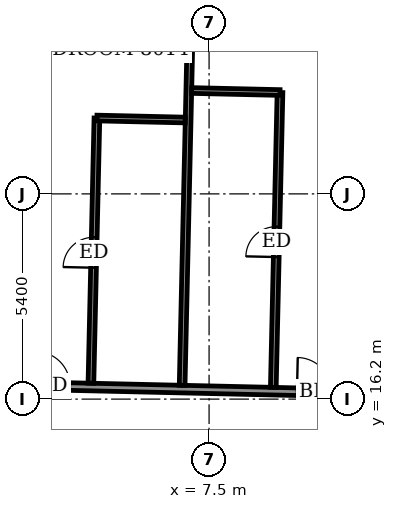
"""IFC4 building model, lengths in metres.
Left out: names, types, materials, properties, quantities, classifications, styles, units other than length and angle.
Written with IfcOpenShell. Run it as: python <this file> out.ifc"""

import sys

from ifc_helpers import new_model, si_unit, direction, frame, frame_2d, origin, place, context, subcontext, project, spatial, rectangle, extrude, element, fill, save


model = new_model("IFC4")
c1 = context("Model", 3, precision=1e-05, world=origin(), true_north=direction((0.0, 1.0)))
c2 = subcontext(c1, "Body", "Model", "MODEL_VIEW")
j1 = project(units=[si_unit("LENGTHUNIT", "METRE"), si_unit("PLANEANGLEUNIT", "RADIAN")], contexts=[c1])
p1 = place(None, origin())
s1 = spatial("IfcSite", under=j1, at=p1, CompositionType="ELEMENT")
p2 = place(p1, origin())
s2 = spatial("IfcBuilding", under=s1, at=p2, CompositionType="ELEMENT")
p3 = place(p2, frame((0.0, 0.0, 313.3)))
s3 = spatial("IfcBuildingStorey", under=s2, at=p3, CompositionType="ELEMENT", Elevation=313.3)
p4 = place(p3, frame((-30.652, 17.313, 0.0), z_axis=(0.0, 0.0, 1.0), x_axis=(0.999742623764, -0.02268669719, 0.0)))
e1 = element("IfcWall", 1, at=p4, inside=s3, PredefinedType="PARTITIONING", context=c2, shape_type="SweptSolid", body=[
    extrude(rectangle(XDim=58.8, YDim=0.2, at=frame_2d((29.4, 0.0))), origin(), (0.0, 0.0, 1.0), 3.05),
])
p5 = place(p4, frame((54.601, 0.0, 0.0)))
e2 = element("IfcOpeningElement", 2, at=p5, cuts=e1, PredefinedType="OPENING", context=c2, shape_type="SweptSolid", body=[
    extrude(rectangle(XDim=1.0, YDim=2.1, at=frame_2d((0.5, 1.05))), frame((0.0, 0.11, 0.0), z_axis=(0.0, -1.0, 0.0), x_axis=(1.0, 0.0, 0.0)), (0.0, 0.0, 1.0), 0.22),
])
p6 = place(p4, frame((49.35, 0.0, 0.0)))
e3 = element("IfcOpeningElement", 3, at=p6, cuts=e1, PredefinedType="OPENING", context=c2, shape_type="SweptSolid", body=[
    extrude(rectangle(XDim=0.9, YDim=2.1, at=frame_2d((0.45, 1.05))), frame((0.0, 0.11, 0.0), z_axis=(0.0, -1.0, 0.0), x_axis=(1.0, 0.0, 0.0)), (0.0, 0.0, 1.0), 0.22),
])
p7 = place(p4, frame((42.55, 0.0, 0.0)))
e4 = element("IfcOpeningElement", 4, at=p7, cuts=e1, PredefinedType="OPENING", context=c2, shape_type="SweptSolid", body=[
    extrude(rectangle(XDim=0.9, YDim=2.1, at=frame_2d((0.45, 1.05))), frame((0.0, 0.11, 0.0), z_axis=(0.0, -1.0, 0.0), x_axis=(1.0, 0.0, 0.0)), (0.0, 0.0, 1.0), 0.22),
])
p8 = place(p4, frame((40.475, 0.0, 0.0)))
e5 = element("IfcOpeningElement", 5, at=p8, cuts=e1, PredefinedType="OPENING", context=c2, shape_type="SweptSolid", body=[
    extrude(rectangle(XDim=0.9, YDim=2.1, at=frame_2d((0.45, 1.05))), frame((0.0, 0.11, 0.0), z_axis=(0.0, -1.0, 0.0), x_axis=(1.0, 0.0, 0.0)), (0.0, 0.0, 1.0), 0.22),
])
p9 = place(p4, frame((33.6, 0.0, 0.0)))
e6 = element("IfcOpeningElement", 6, at=p9, cuts=e1, PredefinedType="OPENING", context=c2, shape_type="SweptSolid", body=[
    extrude(rectangle(XDim=0.9, YDim=2.1, at=frame_2d((0.45, 1.05))), frame((0.0, 0.11, 0.0), z_axis=(0.0, -1.0, 0.0), x_axis=(1.0, 0.0, 0.0)), (0.0, 0.0, 1.0), 0.22),
])
p10 = place(p4, frame((31.55, 0.0, 0.0)))
e7 = element("IfcOpeningElement", 7, at=p10, cuts=e1, PredefinedType="OPENING", context=c2, shape_type="SweptSolid", body=[
    extrude(rectangle(XDim=0.9, YDim=2.1, at=frame_2d((0.45, 1.05))), frame((0.0, 0.11, 0.0), z_axis=(0.0, -1.0, 0.0), x_axis=(1.0, 0.0, 0.0)), (0.0, 0.0, 1.0), 0.22),
])
p11 = place(p4, frame((24.425, 0.0, 0.0)))
e8 = element("IfcOpeningElement", 8, at=p11, cuts=e1, PredefinedType="OPENING", context=c2, shape_type="SweptSolid", body=[
    extrude(rectangle(XDim=0.9, YDim=2.1, at=frame_2d((0.45, 1.05))), frame((0.0, 0.11, 0.0), z_axis=(0.0, -1.0, 0.0), x_axis=(1.0, 0.0, 0.0)), (0.0, 0.0, 1.0), 0.22),
])
p12 = place(p4, frame((22.05, 0.0, 0.0)))
e9 = element("IfcOpeningElement", 9, at=p12, cuts=e1, PredefinedType="OPENING", context=c2, shape_type="SweptSolid", body=[
    extrude(rectangle(XDim=0.9, YDim=2.1, at=frame_2d((0.45, 1.05))), frame((0.0, 0.11, 0.0), z_axis=(0.0, -1.0, 0.0), x_axis=(1.0, 0.0, 0.0)), (0.0, 0.0, 1.0), 0.22),
])
p13 = place(p4, frame((14.95, 0.0, 0.0)))
e10 = element("IfcOpeningElement", 10, at=p13, cuts=e1, PredefinedType="OPENING", context=c2, shape_type="SweptSolid", body=[
    extrude(rectangle(XDim=0.9, YDim=2.1, at=frame_2d((0.45, 1.05))), frame((0.0, 0.11, 0.0), z_axis=(0.0, -1.0, 0.0), x_axis=(1.0, 0.0, 0.0)), (0.0, 0.0, 1.0), 0.22),
])
p14 = place(p4, frame((12.525, 0.0, 0.0)))
e11 = element("IfcOpeningElement", 11, at=p14, cuts=e1, PredefinedType="OPENING", context=c2, shape_type="SweptSolid", body=[
    extrude(rectangle(XDim=0.9, YDim=2.1, at=frame_2d((0.45, 1.05))), frame((0.0, 0.11, 0.0), z_axis=(0.0, -1.0, 0.0), x_axis=(1.0, 0.0, 0.0)), (0.0, 0.0, 1.0), 0.22),
])
p15 = place(p4, frame((4.032, 0.0, 0.0)))
e12 = element("IfcOpeningElement", 12, at=p15, cuts=e1, PredefinedType="OPENING", context=c2, shape_type="SweptSolid", body=[
    extrude(rectangle(XDim=1.0, YDim=2.1, at=frame_2d((0.5, 1.05))), frame((0.0, 0.11, 0.0), z_axis=(0.0, -1.0, 0.0), x_axis=(1.0, 0.0, 0.0)), (0.0, 0.0, 1.0), 0.22),
])
p16 = place(p3, frame((4.391, 16.618, 0.0), z_axis=(0.0, 0.0, 1.0), x_axis=(0.022630826984, 0.999743890039, 0.0)))
e13 = element("IfcWall", 13, at=p16, inside=s3, PredefinedType="PARTITIONING", context=c2, shape_type="SweptSolid", body=[
    extrude(rectangle(XDim=6.98, YDim=0.15, at=frame_2d((3.49, 0.0))), origin(), (0.0, 0.0, 1.0), 3.05),
])
p17 = place(p16, frame((3.04, 0.0, 0.0)))
e14 = element("IfcOpeningElement", 14, at=p17, cuts=e13, PredefinedType="OPENING", context=c2, shape_type="SweptSolid", body=[
    extrude(rectangle(XDim=0.8, YDim=2.1, at=frame_2d((0.4, 1.05))), frame((0.0, 0.085, 0.0), z_axis=(0.0, -1.0, 0.0), x_axis=(1.0, 0.0, 0.0)), (0.0, 0.0, 1.0), 0.17),
])
p18 = place(p3, frame((6.791, 16.563, 0.0), z_axis=(0.0, 0.0, 1.0), x_axis=(0.022661475803, 0.999743195783, 0.0)))
e15 = element("IfcWall", 15, at=p18, inside=s3, PredefinedType="PARTITIONING", context=c2, shape_type="SweptSolid", body=[
    extrude(rectangle(XDim=12.4, YDim=0.15, at=frame_2d((6.2, 0.0))), origin(), (0.0, 0.0, 1.0), 2.5),
])
p19 = place(p3, frame((9.19, 16.509, 0.0), z_axis=(0.0, 0.0, 1.0), x_axis=(0.022683528451, 0.999742695666, 0.0)))
e16 = element("IfcWall", 16, at=p19, inside=s3, PredefinedType="PARTITIONING", context=c2, shape_type="SweptSolid", body=[
    extrude(rectangle(XDim=7.76, YDim=0.15, at=frame_2d((3.88, 0.0))), origin(), (0.0, 0.0, 1.0), 3.05),
])
p20 = place(p19, frame((3.43, 0.0, 0.0)))
e17 = element("IfcOpeningElement", 17, at=p20, cuts=e16, PredefinedType="OPENING", context=c2, shape_type="SweptSolid", body=[
    extrude(rectangle(XDim=0.8, YDim=2.1, at=frame_2d((0.4, 1.05))), frame((0.0, 0.085, 0.0), z_axis=(0.0, -1.0, 0.0), x_axis=(1.0, 0.0, 0.0)), (0.0, 0.0, 1.0), 0.17),
])
p21 = place(p3, frame((4.549, 23.596, 0.0), z_axis=(0.0, 0.0, 1.0), x_axis=(0.999740478815, -0.022781023197, 0.0)))
e18 = element("IfcWall", 18, at=p21, inside=s3, PredefinedType="PARTITIONING", context=c2, shape_type="SweptSolid", body=[
    extrude(rectangle(XDim=2.325, YDim=0.15, at=frame_2d((1.163, 0.0))), origin(), (0.0, 0.0, 1.0), 3.05),
])
p22 = place(p3, frame((7.042, 24.32, 0.0), z_axis=(0.0, 0.0, 1.0), x_axis=(0.999740260747, -0.02279059109, 0.0)))
e19 = element("IfcWall", 19, at=p22, inside=s3, PredefinedType="PARTITIONING", context=c2, shape_type="SweptSolid", body=[
    extrude(rectangle(XDim=2.324, YDim=0.15, at=frame_2d((1.162, 0.0))), origin(), (0.0, 0.0, 1.0), 3.05),
])
p23 = place(p8, origin())
e20 = element("IfcDoor", 20, at=p23, inside=s3, OperationType="SINGLE_SWING_LEFT", PredefinedType="DOOR", context=c2, shape_type="SweptSolid", body=[
    extrude(rectangle(XDim=0.9, YDim=2.1, at=frame_2d((0.45, 1.05))), frame((0.0, 0.025, 0.0), z_axis=(0.0, -1.0, 0.0), x_axis=(1.0, 0.0, 0.0)), (0.0, 0.0, 1.0), 0.05),
])
fill(e5, e20)
p24 = place(p20, origin())
e21 = element("IfcDoor", 21, at=p24, inside=s3, OperationType="SINGLE_SWING_LEFT", PredefinedType="DOOR", context=c2, shape_type="SweptSolid", body=[
    extrude(rectangle(XDim=0.8, YDim=2.1, at=frame_2d((0.4, 1.05))), frame((0.0, 0.025, 0.0), z_axis=(0.0, -1.0, 0.0), x_axis=(1.0, 0.0, 0.0)), (0.0, 0.0, 1.0), 0.05),
])
fill(e17, e21)
p25 = place(p9, origin())
e22 = element("IfcDoor", 22, at=p25, inside=s3, OperationType="SINGLE_SWING_RIGHT", PredefinedType="DOOR", context=c2, shape_type="SweptSolid", body=[
    extrude(rectangle(XDim=0.9, YDim=2.1, at=frame_2d((0.45, 1.05))), frame((0.0, 0.025, 0.0), z_axis=(0.0, -1.0, 0.0), x_axis=(1.0, 0.0, 0.0)), (0.0, 0.0, 1.0), 0.05),
])
fill(e6, e22)
p26 = place(p17, origin())
e23 = element("IfcDoor", 23, at=p26, inside=s3, OperationType="SINGLE_SWING_RIGHT", PredefinedType="DOOR", context=c2, shape_type="SweptSolid", body=[
    extrude(rectangle(XDim=0.8, YDim=2.1, at=frame_2d((0.4, 1.05))), frame((0.0, 0.025, 0.0), z_axis=(0.0, -1.0, 0.0), x_axis=(1.0, 0.0, 0.0)), (0.0, 0.0, 1.0), 0.05),
])
fill(e14, e23)
save(model, sys.argv[1])
